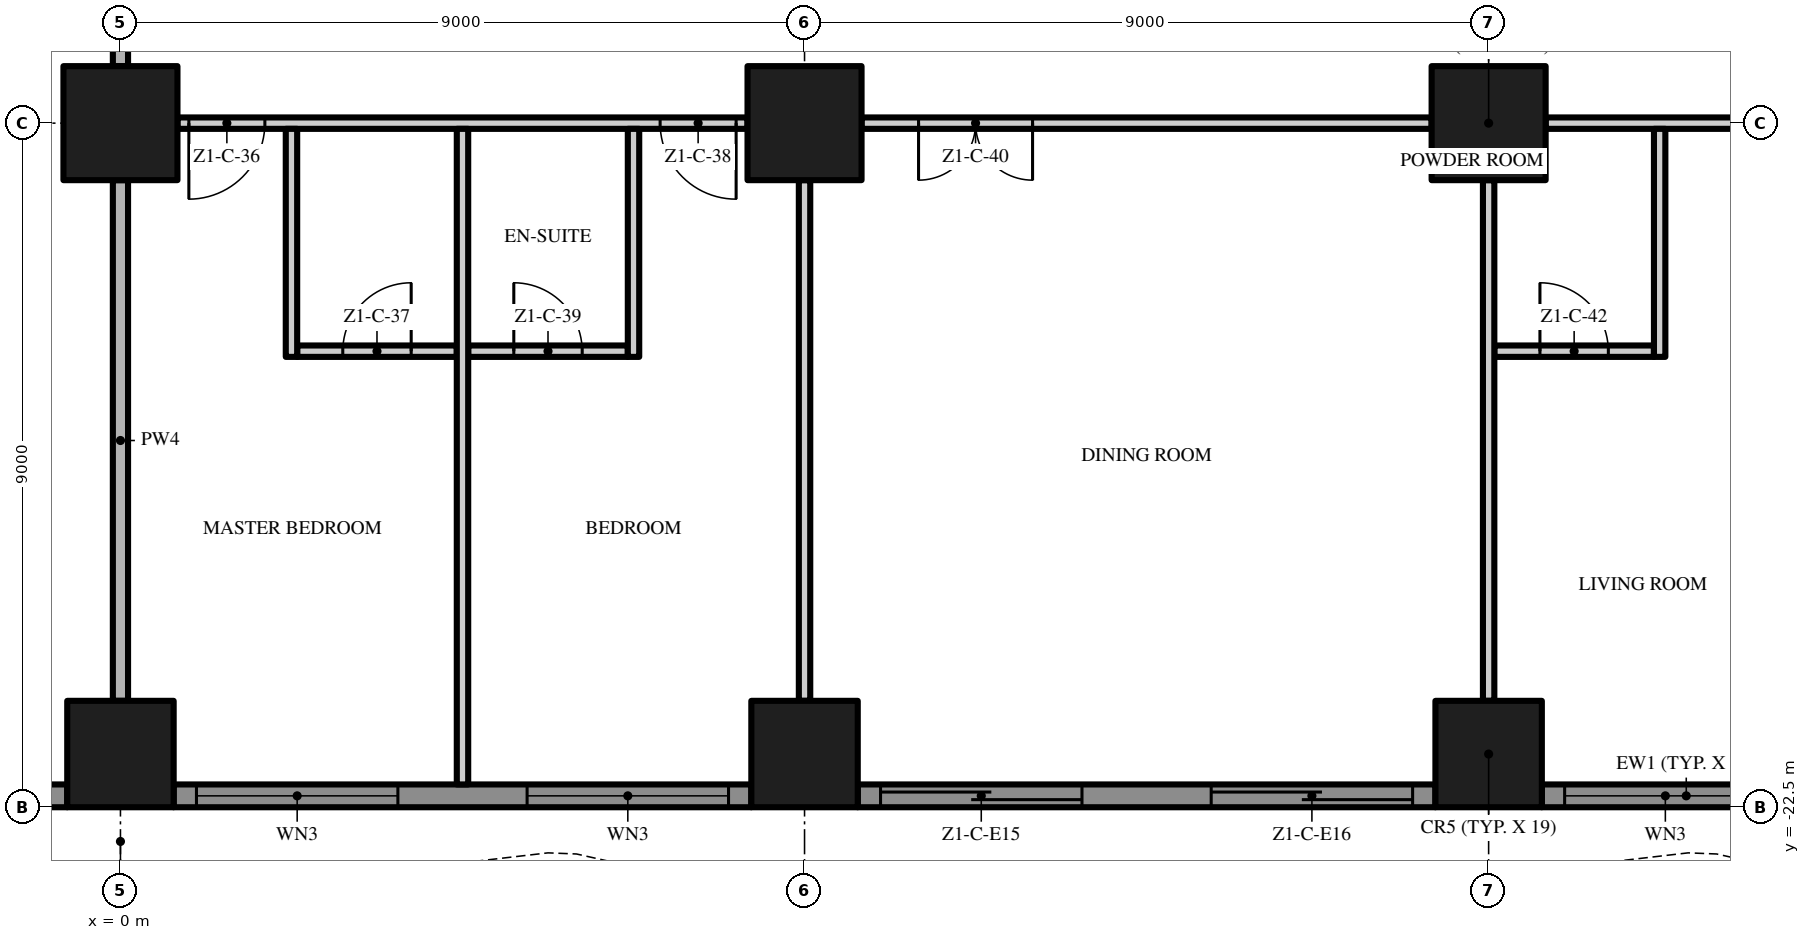
"""IFC4 building model, lengths in metres.
Left out: names, types, materials, properties, quantities, classifications, styles, units other than length and angle.
Written with IfcOpenShell. Run it as: python <this file> out.ifc"""

import sys

from ifc_helpers import new_model, si_unit, direction, frame, frame_2d, origin, origin_2d, place, context, subcontext, project, spatial, polyline, rectangle, outline, extrude, element, fill, save


model = new_model("IFC4")
c1 = context("Model", 3, precision=1e-05, world=origin(), true_north=direction((0.0, 1.0)))
c2 = subcontext(c1, "Body", "Model", "MODEL_VIEW")
j1 = project(units=[si_unit("LENGTHUNIT", "METRE"), si_unit("PLANEANGLEUNIT", "RADIAN")], contexts=[c1])
p1 = place(None, origin())
s1 = spatial("IfcSite", under=j1, at=p1, CompositionType="ELEMENT")
p2 = place(p1, origin())
s2 = spatial("IfcBuilding", under=s1, at=p2, CompositionType="ELEMENT")
p3 = place(p2, frame((0.0, 0.0, 41.6)))
s3 = spatial("IfcBuildingStorey", under=s2, at=p3, CompositionType="ELEMENT", Elevation=41.6)
p4 = place(p3, frame((0.0, -13.5, 0.0), z_axis=(0.0, 0.0, 1.0), x_axis=(1.0, 0.0, 0.0)))
e1 = element("IfcColumn", 1, at=p4, inside=s3, PredefinedType="COLUMN", context=c2, shape_type="SweptSolid", body=[
    extrude(rectangle(XDim=1.5, YDim=1.5, at=origin_2d()), origin(), (0.0, 0.0, 1.0), 3.5),
])
p5 = place(p3, frame((0.0, -21.8, 0.0), z_axis=(0.0, 0.0, 1.0), x_axis=(1.0, 0.0, 0.0)))
e2 = element("IfcColumn", 2, at=p5, inside=s3, PredefinedType="COLUMN", context=c2, shape_type="SweptSolid", body=[
    extrude(rectangle(XDim=1.4, YDim=1.4, at=origin_2d()), origin(), (0.0, 0.0, 1.0), 3.5),
])
p6 = place(p3, frame((18.0, -13.5, 0.0), z_axis=(0.0, 0.0, 1.0), x_axis=(1.0, 0.0, 0.0)))
e3 = element("IfcColumn", 3, at=p6, inside=s3, PredefinedType="COLUMN", context=c2, shape_type="SweptSolid", body=[
    extrude(rectangle(XDim=1.5, YDim=1.5, at=origin_2d()), origin(), (0.0, 0.0, 1.0), 3.5),
])
p7 = place(p3, frame((18.0, -21.8, 0.0), z_axis=(0.0, 0.0, 1.0), x_axis=(1.0, 0.0, 0.0)))
e4 = element("IfcColumn", 4, at=p7, inside=s3, PredefinedType="COLUMN", context=c2, shape_type="SweptSolid", body=[
    extrude(rectangle(XDim=1.4, YDim=1.4, at=origin_2d()), origin(), (0.0, 0.0, 1.0), 3.5),
])
p8 = place(p3, frame((9.0, -13.5, 0.0), z_axis=(0.0, 0.0, 1.0), x_axis=(1.0, 0.0, 0.0)))
e5 = element("IfcColumn", 5, at=p8, inside=s3, PredefinedType="COLUMN", context=c2, shape_type="SweptSolid", body=[
    extrude(rectangle(XDim=1.5, YDim=1.5, at=origin_2d()), origin(), (0.0, 0.0, 1.0), 3.5),
])
p9 = place(p3, frame((9.0, -21.8, 0.0), z_axis=(0.0, 0.0, 1.0), x_axis=(1.0, 0.0, 0.0)))
e6 = element("IfcColumn", 6, at=p9, inside=s3, PredefinedType="COLUMN", context=c2, shape_type="SweptSolid", body=[
    extrude(rectangle(XDim=1.4, YDim=1.4, at=origin_2d()), origin(), (0.0, 0.0, 1.0), 3.5),
])
p10 = place(p3, frame((-0.7, -22.35, 0.0), z_axis=(0.0, 0.0, 1.0), x_axis=(-1.0, 0.0, 0.0)))
e7 = element("IfcWall", 7, at=p10, inside=s3, PredefinedType="SOLIDWALL", context=c2, shape_type="SweptSolid", body=[
    extrude(rectangle(XDim=7.6, YDim=0.3, at=frame_2d((3.8, 0.0))), origin(), (0.0, 0.0, 1.0), 3.5),
])
p11 = place(p10, frame((4.65, 0.0, 0.45)))
e8 = element("IfcOpeningElement", 8, at=p11, cuts=e7, PredefinedType="OPENING", context=c2, shape_type="SweptSolid", body=[
    extrude(rectangle(XDim=2.65, YDim=2.65, at=frame_2d((1.325, 1.325))), frame((0.0, 0.16, 0.0), z_axis=(0.0, -1.0, 0.0), x_axis=(1.0, 0.0, 0.0)), (0.0, 0.0, 1.0), 0.32),
])
p12 = place(p10, frame((0.3, 0.0, 0.0)))
e9 = element("IfcOpeningElement", 9, at=p12, cuts=e7, PredefinedType="OPENING", context=c2, shape_type="SweptSolid", body=[
    extrude(rectangle(XDim=2.65, YDim=2.4, at=frame_2d((1.325, 1.2))), frame((0.0, 0.16, 0.0), z_axis=(0.0, -1.0, 0.0), x_axis=(1.0, 0.0, 0.0)), (0.0, 0.0, 1.0), 0.32),
])
p13 = place(p3, frame((8.3, -22.35, 0.0), z_axis=(0.0, 0.0, 1.0), x_axis=(-1.0, 0.0, 0.0)))
e10 = element("IfcWall", 10, at=p13, inside=s3, PredefinedType="SOLIDWALL", context=c2, shape_type="SweptSolid", body=[
    extrude(rectangle(XDim=7.6, YDim=0.3, at=frame_2d((3.8, 0.0))), origin(), (0.0, 0.0, 1.0), 3.5),
])
p14 = place(p13, frame((4.65, 0.0, 0.45)))
e11 = element("IfcOpeningElement", 11, at=p14, cuts=e10, PredefinedType="OPENING", context=c2, shape_type="SweptSolid", body=[
    extrude(rectangle(XDim=2.65, YDim=2.65, at=frame_2d((1.325, 1.325))), frame((0.0, 0.16, 0.0), z_axis=(0.0, -1.0, 0.0), x_axis=(1.0, 0.0, 0.0)), (0.0, 0.0, 1.0), 0.32),
])
p15 = place(p13, frame((0.3, 0.0, 0.45)))
e12 = element("IfcOpeningElement", 12, at=p15, cuts=e10, PredefinedType="OPENING", context=c2, shape_type="SweptSolid", body=[
    extrude(rectangle(XDim=2.65, YDim=2.65, at=frame_2d((1.325, 1.325))), frame((0.0, 0.16, 0.0), z_axis=(0.0, -1.0, 0.0), x_axis=(1.0, 0.0, 0.0)), (0.0, 0.0, 1.0), 0.32),
])
p16 = place(p3, frame((17.3, -22.35, 0.0), z_axis=(0.0, 0.0, 1.0), x_axis=(-1.0, 0.0, 0.0)))
e13 = element("IfcWall", 13, at=p16, inside=s3, PredefinedType="SOLIDWALL", context=c2, shape_type="SweptSolid", body=[
    extrude(rectangle(XDim=7.6, YDim=0.3, at=frame_2d((3.8, 0.0))), origin(), (0.0, 0.0, 1.0), 3.5),
])
p17 = place(p16, frame((4.65, 0.0, 0.0)))
e14 = element("IfcOpeningElement", 14, at=p17, cuts=e13, PredefinedType="OPENING", context=c2, shape_type="SweptSolid", body=[
    extrude(rectangle(XDim=2.65, YDim=2.4, at=frame_2d((1.325, 1.2))), frame((0.0, 0.16, 0.0), z_axis=(0.0, -1.0, 0.0), x_axis=(1.0, 0.0, 0.0)), (0.0, 0.0, 1.0), 0.32),
])
p18 = place(p16, frame((0.3, 0.0, 0.0)))
e15 = element("IfcOpeningElement", 15, at=p18, cuts=e13, PredefinedType="OPENING", context=c2, shape_type="SweptSolid", body=[
    extrude(rectangle(XDim=2.65, YDim=2.4, at=frame_2d((1.325, 1.2))), frame((0.0, 0.16, 0.0), z_axis=(0.0, -1.0, 0.0), x_axis=(1.0, 0.0, 0.0)), (0.0, 0.0, 1.0), 0.32),
])
p19 = place(p3, frame((22.5, -22.35, 0.0), z_axis=(0.0, 0.0, 1.0), x_axis=(-1.0, 0.0, 0.0)))
e16 = element("IfcWall", 16, at=p19, inside=s3, PredefinedType="SOLIDWALL", context=c2, shape_type="SweptSolid", body=[
    extrude(rectangle(XDim=3.8, YDim=0.3, at=frame_2d((1.9, 0.0))), origin(), (0.0, 0.0, 1.0), 3.5),
])
p20 = place(p19, frame((0.85, 0.0, 0.45)))
e17 = element("IfcOpeningElement", 17, at=p20, cuts=e16, PredefinedType="OPENING", context=c2, shape_type="SweptSolid", body=[
    extrude(rectangle(XDim=2.65, YDim=2.65, at=frame_2d((1.325, 1.325))), frame((0.0, 0.16, 0.0), z_axis=(0.0, -1.0, 0.0), x_axis=(1.0, 0.0, 0.0)), (0.0, 0.0, 1.0), 0.32),
])
p21 = place(p3, origin())
e18 = element("IfcWall", 18, at=p21, inside=s3, PredefinedType="USERDEFINED", context=c2, shape_type="SweptSolid", body=[
    extrude(outline(polyline([(-22.5, -23.451), (-21.0, -24.112), (-19.5, -24.845), (-18.0, -25.369), (-16.875, -25.5), (-16.5, -25.485), (-15.0, -25.149), (-13.5, -24.488), (-12.0, -23.755), (-10.5, -23.231), (-9.375, -23.1), (-9.0, -23.115), (-7.5, -23.451), (-6.0, -24.112), (-4.5, -24.845), (-3.0, -25.369), (-1.875, -25.5), (-1.5, -25.485), (0.0, -25.149), (1.5, -24.488), (3.0, -23.755), (4.5, -23.231), (5.625, -23.1), (6.0, -23.115), (7.5, -23.451), (9.0, -24.112), (10.5, -24.845), (12.0, -25.369), (13.125, -25.5), (13.5, -25.485), (15.0, -25.149), (16.5, -24.488), (18.0, -23.755), (19.5, -23.231), (20.625, -23.1), (21.0, -23.115), (22.5, -23.451), (22.555, -23.208), (21.033, -22.866), (20.615, -22.849), (19.444, -22.986), (17.904, -23.524), (16.395, -24.261), (14.921, -24.91), (13.467, -25.236), (13.135, -25.249), (12.056, -25.124), (10.596, -24.614), (9.105, -23.885), (7.579, -23.213), (6.033, -22.866), (5.615, -22.849), (4.444, -22.986), (2.904, -23.524), (1.395, -24.261), (-0.079, -24.91), (-1.533, -25.236), (-1.865, -25.249), (-2.944, -25.124), (-4.404, -24.614), (-5.895, -23.885), (-7.421, -23.213), (-8.967, -22.866), (-9.385, -22.849), (-10.556, -22.986), (-12.096, -23.524), (-13.605, -24.261), (-15.079, -24.91), (-16.533, -25.236), (-16.865, -25.249), (-17.944, -25.124), (-19.404, -24.614), (-20.895, -23.885), (-22.399, -23.223), (-22.5, -23.451)])), origin(), (0.0, 0.0, 1.0), 0.9),
])
p22 = place(p3, frame((2.325, -16.5, 0.0), z_axis=(0.0, 0.0, 1.0), x_axis=(1.0, 0.0, 0.0)))
e19 = element("IfcWall", 19, at=p22, inside=s3, PredefinedType="PARTITIONING", context=c2, shape_type="SweptSolid", body=[
    extrude(rectangle(XDim=2.1, YDim=0.15, at=frame_2d((1.05, 0.0))), origin(), (0.0, 0.0, 1.0), 3.5),
])
p23 = place(p22, frame((0.6, 0.0, 0.0)))
e20 = element("IfcOpeningElement", 20, at=p23, cuts=e19, PredefinedType="OPENING", context=c2, shape_type="SweptSolid", body=[
    extrude(rectangle(XDim=0.9, YDim=2.1, at=frame_2d((0.45, 1.05))), frame((0.0, 0.085, 0.0), z_axis=(0.0, -1.0, 0.0), x_axis=(1.0, 0.0, 0.0)), (0.0, 0.0, 1.0), 0.17),
])
p24 = place(p3, frame((4.575, -16.5, 0.0), z_axis=(0.0, 0.0, 1.0), x_axis=(1.0, 0.0, 0.0)))
e21 = element("IfcWall", 21, at=p24, inside=s3, PredefinedType="PARTITIONING", context=c2, shape_type="SweptSolid", body=[
    extrude(rectangle(XDim=2.1, YDim=0.15, at=frame_2d((1.05, 0.0))), origin(), (0.0, 0.0, 1.0), 3.5),
])
p25 = place(p24, frame((0.6, 0.0, 0.0)))
e22 = element("IfcOpeningElement", 22, at=p25, cuts=e21, PredefinedType="OPENING", context=c2, shape_type="SweptSolid", body=[
    extrude(rectangle(XDim=0.9, YDim=2.1, at=frame_2d((0.45, 1.05))), frame((0.0, 0.085, 0.0), z_axis=(0.0, -1.0, 0.0), x_axis=(1.0, 0.0, 0.0)), (0.0, 0.0, 1.0), 0.17),
])
p26 = place(p3, frame((18.075, -16.5, 0.0), z_axis=(0.0, 0.0, 1.0), x_axis=(1.0, 0.0, 0.0)))
e23 = element("IfcWall", 23, at=p26, inside=s3, PredefinedType="PARTITIONING", context=c2, shape_type="SweptSolid", body=[
    extrude(rectangle(XDim=2.1, YDim=0.15, at=frame_2d((1.05, 0.0))), origin(), (0.0, 0.0, 1.0), 3.5),
])
p27 = place(p26, frame((0.6, 0.0, 0.0)))
e24 = element("IfcOpeningElement", 24, at=p27, cuts=e23, PredefinedType="OPENING", context=c2, shape_type="SweptSolid", body=[
    extrude(rectangle(XDim=0.9, YDim=2.1, at=frame_2d((0.45, 1.05))), frame((0.0, 0.085, 0.0), z_axis=(0.0, -1.0, 0.0), x_axis=(1.0, 0.0, 0.0)), (0.0, 0.0, 1.0), 0.17),
])
p28 = place(p3, frame((8.25, -13.5, 0.0), z_axis=(0.0, 0.0, 1.0), x_axis=(-1.0, 0.0, 0.0)))
e25 = element("IfcWall", 25, at=p28, inside=s3, PredefinedType="PARTITIONING", context=c2, shape_type="SweptSolid", body=[
    extrude(rectangle(XDim=7.5, YDim=0.15, at=frame_2d((3.75, 0.0))), origin(), (0.0, 0.0, 1.0), 3.5),
])
p29 = place(p28, frame((6.35, 0.0, 0.0)))
e26 = element("IfcOpeningElement", 26, at=p29, cuts=e25, PredefinedType="OPENING", context=c2, shape_type="SweptSolid", body=[
    extrude(rectangle(XDim=1.0, YDim=2.4, at=frame_2d((0.5, 1.2))), frame((0.0, 0.085, 0.0), z_axis=(0.0, -1.0, 0.0), x_axis=(1.0, 0.0, 0.0)), (0.0, 0.0, 1.0), 0.17),
])
p30 = place(p28, frame((0.15, 0.0, 0.0)))
e27 = element("IfcOpeningElement", 27, at=p30, cuts=e25, PredefinedType="OPENING", context=c2, shape_type="SweptSolid", body=[
    extrude(rectangle(XDim=1.0, YDim=2.4, at=frame_2d((0.5, 1.2))), frame((0.0, 0.085, 0.0), z_axis=(0.0, -1.0, 0.0), x_axis=(1.0, 0.0, 0.0)), (0.0, 0.0, 1.0), 0.17),
])
p31 = place(p3, frame((17.25, -13.5, 0.0), z_axis=(0.0, 0.0, 1.0), x_axis=(-1.0, 0.0, 0.0)))
e28 = element("IfcWall", 28, at=p31, inside=s3, PredefinedType="PARTITIONING", context=c2, shape_type="SweptSolid", body=[
    extrude(rectangle(XDim=7.5, YDim=0.15, at=frame_2d((3.75, 0.0))), origin(), (0.0, 0.0, 1.0), 3.5),
])
p32 = place(p31, frame((5.25, 0.0, 0.0)))
e29 = element("IfcOpeningElement", 29, at=p32, cuts=e28, PredefinedType="OPENING", context=c2, shape_type="SweptSolid", body=[
    extrude(rectangle(XDim=1.5, YDim=2.4, at=frame_2d((0.75, 1.2))), frame((0.0, 0.085, 0.0), z_axis=(0.0, -1.0, 0.0), x_axis=(1.0, 0.0, 0.0)), (0.0, 0.0, 1.0), 0.17),
])
p33 = place(p3, frame((25.6, -13.5, 0.0), z_axis=(0.0, 0.0, 1.0), x_axis=(-1.0, 0.0, 0.0)))
e30 = element("IfcWall", 30, at=p33, inside=s3, PredefinedType="PARTITIONING", context=c2, shape_type="SweptSolid", body=[
    extrude(rectangle(XDim=6.85, YDim=0.15, at=frame_2d((3.425, 0.0))), origin(), (0.0, 0.0, 1.0), 3.5),
])
p34 = place(p33, frame((1.1, 0.0, 0.0)))
e31 = element("IfcOpeningElement", 31, at=p34, cuts=e30, PredefinedType="OPENING", context=c2, shape_type="SweptSolid", body=[
    extrude(rectangle(XDim=1.8, YDim=2.4, at=frame_2d((0.9, 1.2))), frame((0.0, 0.085, 0.0), z_axis=(0.0, -1.0, 0.0), x_axis=(1.0, 0.0, 0.0)), (0.0, 0.0, 1.0), 0.17),
])
p35 = place(p3, frame((0.0, -21.1, 0.0), z_axis=(0.0, 0.0, 1.0), x_axis=(0.0, 1.0, 0.0)))
e32 = element("IfcWall", 32, at=p35, inside=s3, PredefinedType="PARTITIONING", context=c2, shape_type="SweptSolid", body=[
    extrude(rectangle(XDim=6.85, YDim=0.2, at=frame_2d((3.425, 0.0))), origin(), (0.0, 0.0, 1.0), 3.5),
])
p36 = place(p3, frame((0.0, -12.75, 0.0), z_axis=(0.0, 0.0, 1.0), x_axis=(0.0, 1.0, 0.0)))
e33 = element("IfcWall", 33, at=p36, inside=s3, PredefinedType="PARTITIONING", context=c2, shape_type="SweptSolid", body=[
    extrude(rectangle(XDim=7.5, YDim=0.2, at=frame_2d((3.75, 0.0))), origin(), (0.0, 0.0, 1.0), 3.5),
])
p37 = place(p3, frame((2.25, -16.575, 0.0), z_axis=(0.0, 0.0, 1.0), x_axis=(0.0, 1.0, 0.0)))
e34 = element("IfcWall", 34, at=p37, inside=s3, PredefinedType="PARTITIONING", context=c2, shape_type="SweptSolid", body=[
    extrude(rectangle(XDim=3.0, YDim=0.15, at=frame_2d((1.5, 0.0))), origin(), (0.0, 0.0, 1.0), 3.5),
])
p38 = place(p3, frame((4.5, -22.2, 0.0), z_axis=(0.0, 0.0, 1.0), x_axis=(0.0, 1.0, 0.0)))
e35 = element("IfcWall", 35, at=p38, inside=s3, PredefinedType="PARTITIONING", context=c2, shape_type="SweptSolid", body=[
    extrude(rectangle(XDim=8.625, YDim=0.15, at=frame_2d((4.312, 0.0))), origin(), (0.0, 0.0, 1.0), 3.5),
])
p39 = place(p3, frame((6.75, -16.575, 0.0), z_axis=(0.0, 0.0, 1.0), x_axis=(0.0, 1.0, 0.0)))
e36 = element("IfcWall", 36, at=p39, inside=s3, PredefinedType="PARTITIONING", context=c2, shape_type="SweptSolid", body=[
    extrude(rectangle(XDim=3.0, YDim=0.15, at=frame_2d((1.5, 0.0))), origin(), (0.0, 0.0, 1.0), 3.5),
])
for number, where, z_axis, x_axis in (
    (37, (9.0, -21.1, 0.0), (0.0, 0.0, 1.0), (0.0, 1.0, 0.0)),
    (38, (18.0, -21.1, 0.0), (0.0, 0.0, 1.0), (0.0, 1.0, 0.0)),
):
    element("IfcWall", number, at=place(p3, frame(where, z_axis=z_axis, x_axis=x_axis)), inside=s3, PredefinedType="PARTITIONING", context=c2, shape_type="SweptSolid", body=[
        extrude(rectangle(XDim=6.85, YDim=0.15, at=frame_2d((3.425, 0.0))), origin(), (0.0, 0.0, 1.0), 3.5),
    ])
p40 = place(p3, frame((20.25, -16.575, 0.0), z_axis=(0.0, 0.0, 1.0), x_axis=(0.0, 1.0, 0.0)))
e39 = element("IfcWall", 39, at=p40, inside=s3, PredefinedType="PARTITIONING", context=c2, shape_type="SweptSolid", body=[
    extrude(rectangle(XDim=3.0, YDim=0.15, at=frame_2d((1.5, 0.0))), origin(), (0.0, 0.0, 1.0), 3.5),
])
p41 = place(p14, origin())
e40 = element("IfcWindow", 40, at=p41, inside=s3, PartitioningType="SINGLE_PANEL", PredefinedType="WINDOW", context=c2, shape_type="SweptSolid", body=[
    extrude(rectangle(XDim=2.65, YDim=2.65, at=frame_2d((1.325, 1.325))), frame((0.0, 0.03, 0.0), z_axis=(0.0, -1.0, 0.0), x_axis=(1.0, 0.0, 0.0)), (0.0, 0.0, 1.0), 0.06),
])
fill(e11, e40)
p42 = place(p15, origin())
e41 = element("IfcWindow", 41, at=p42, inside=s3, PartitioningType="SINGLE_PANEL", PredefinedType="WINDOW", context=c2, shape_type="SweptSolid", body=[
    extrude(rectangle(XDim=2.65, YDim=2.65, at=frame_2d((1.325, 1.325))), frame((0.0, 0.03, 0.0), z_axis=(0.0, -1.0, 0.0), x_axis=(1.0, 0.0, 0.0)), (0.0, 0.0, 1.0), 0.06),
])
fill(e12, e41)
p43 = place(p17, origin())
e42 = element("IfcDoor", 42, at=p43, inside=s3, OperationType="SINGLE_SWING_LEFT", PredefinedType="DOOR", context=c2, shape_type="SweptSolid", body=[
    extrude(rectangle(XDim=2.65, YDim=2.4, at=frame_2d((1.325, 1.2))), frame((0.0, 0.025, 0.0), z_axis=(0.0, -1.0, 0.0), x_axis=(1.0, 0.0, 0.0)), (0.0, 0.0, 1.0), 0.05),
])
fill(e14, e42)
p44 = place(p18, origin())
e43 = element("IfcDoor", 43, at=p44, inside=s3, OperationType="SINGLE_SWING_LEFT", PredefinedType="DOOR", context=c2, shape_type="SweptSolid", body=[
    extrude(rectangle(XDim=2.65, YDim=2.4, at=frame_2d((1.325, 1.2))), frame((0.0, 0.025, 0.0), z_axis=(0.0, -1.0, 0.0), x_axis=(1.0, 0.0, 0.0)), (0.0, 0.0, 1.0), 0.05),
])
fill(e15, e43)
p45 = place(p20, origin())
e44 = element("IfcWindow", 44, at=p45, inside=s3, PartitioningType="SINGLE_PANEL", PredefinedType="WINDOW", context=c2, shape_type="SweptSolid", body=[
    extrude(rectangle(XDim=2.65, YDim=2.65, at=frame_2d((1.325, 1.325))), frame((0.0, 0.03, 0.0), z_axis=(0.0, -1.0, 0.0), x_axis=(1.0, 0.0, 0.0)), (0.0, 0.0, 1.0), 0.06),
])
fill(e17, e44)
p46 = place(p29, origin())
e45 = element("IfcDoor", 45, at=p46, inside=s3, OperationType="SINGLE_SWING_RIGHT", PredefinedType="DOOR", context=c2, shape_type="SweptSolid", body=[
    extrude(rectangle(XDim=1.0, YDim=2.4, at=frame_2d((0.5, 1.2))), frame((0.0, 0.025, 0.0), z_axis=(0.0, -1.0, 0.0), x_axis=(1.0, 0.0, 0.0)), (0.0, 0.0, 1.0), 0.05),
])
fill(e26, e45)
p47 = place(p23, origin())
e46 = element("IfcDoor", 46, at=p47, inside=s3, OperationType="SINGLE_SWING_RIGHT", PredefinedType="DOOR", context=c2, shape_type="SweptSolid", body=[
    extrude(rectangle(XDim=0.9, YDim=2.1, at=frame_2d((0.45, 1.05))), frame((0.0, 0.025, 0.0), z_axis=(0.0, -1.0, 0.0), x_axis=(1.0, 0.0, 0.0)), (0.0, 0.0, 1.0), 0.05),
])
fill(e20, e46)
p48 = place(p30, origin())
e47 = element("IfcDoor", 47, at=p48, inside=s3, OperationType="SINGLE_SWING_LEFT", PredefinedType="DOOR", context=c2, shape_type="SweptSolid", body=[
    extrude(rectangle(XDim=1.0, YDim=2.4, at=frame_2d((0.5, 1.2))), frame((0.0, 0.025, 0.0), z_axis=(0.0, -1.0, 0.0), x_axis=(1.0, 0.0, 0.0)), (0.0, 0.0, 1.0), 0.05),
])
fill(e27, e47)
p49 = place(p25, origin())
e48 = element("IfcDoor", 48, at=p49, inside=s3, OperationType="SINGLE_SWING_LEFT", PredefinedType="DOOR", context=c2, shape_type="SweptSolid", body=[
    extrude(rectangle(XDim=0.9, YDim=2.1, at=frame_2d((0.45, 1.05))), frame((0.0, 0.025, 0.0), z_axis=(0.0, -1.0, 0.0), x_axis=(1.0, 0.0, 0.0)), (0.0, 0.0, 1.0), 0.05),
])
fill(e22, e48)
p50 = place(p32, origin())
e49 = element("IfcDoor", 49, at=p50, inside=s3, OperationType="DOUBLE_DOOR_SINGLE_SWING", PredefinedType="DOOR", context=c2, shape_type="SweptSolid", body=[
    extrude(rectangle(XDim=1.5, YDim=2.4, at=frame_2d((0.75, 1.2))), frame((0.0, 0.025, 0.0), z_axis=(0.0, -1.0, 0.0), x_axis=(1.0, 0.0, 0.0)), (0.0, 0.0, 1.0), 0.05),
])
fill(e29, e49)
p51 = place(p27, origin())
e50 = element("IfcDoor", 50, at=p51, inside=s3, OperationType="SINGLE_SWING_LEFT", PredefinedType="DOOR", context=c2, shape_type="SweptSolid", body=[
    extrude(rectangle(XDim=0.9, YDim=2.1, at=frame_2d((0.45, 1.05))), frame((0.0, 0.025, 0.0), z_axis=(0.0, -1.0, 0.0), x_axis=(1.0, 0.0, 0.0)), (0.0, 0.0, 1.0), 0.05),
])
fill(e24, e50)
save(model, sys.argv[1])
